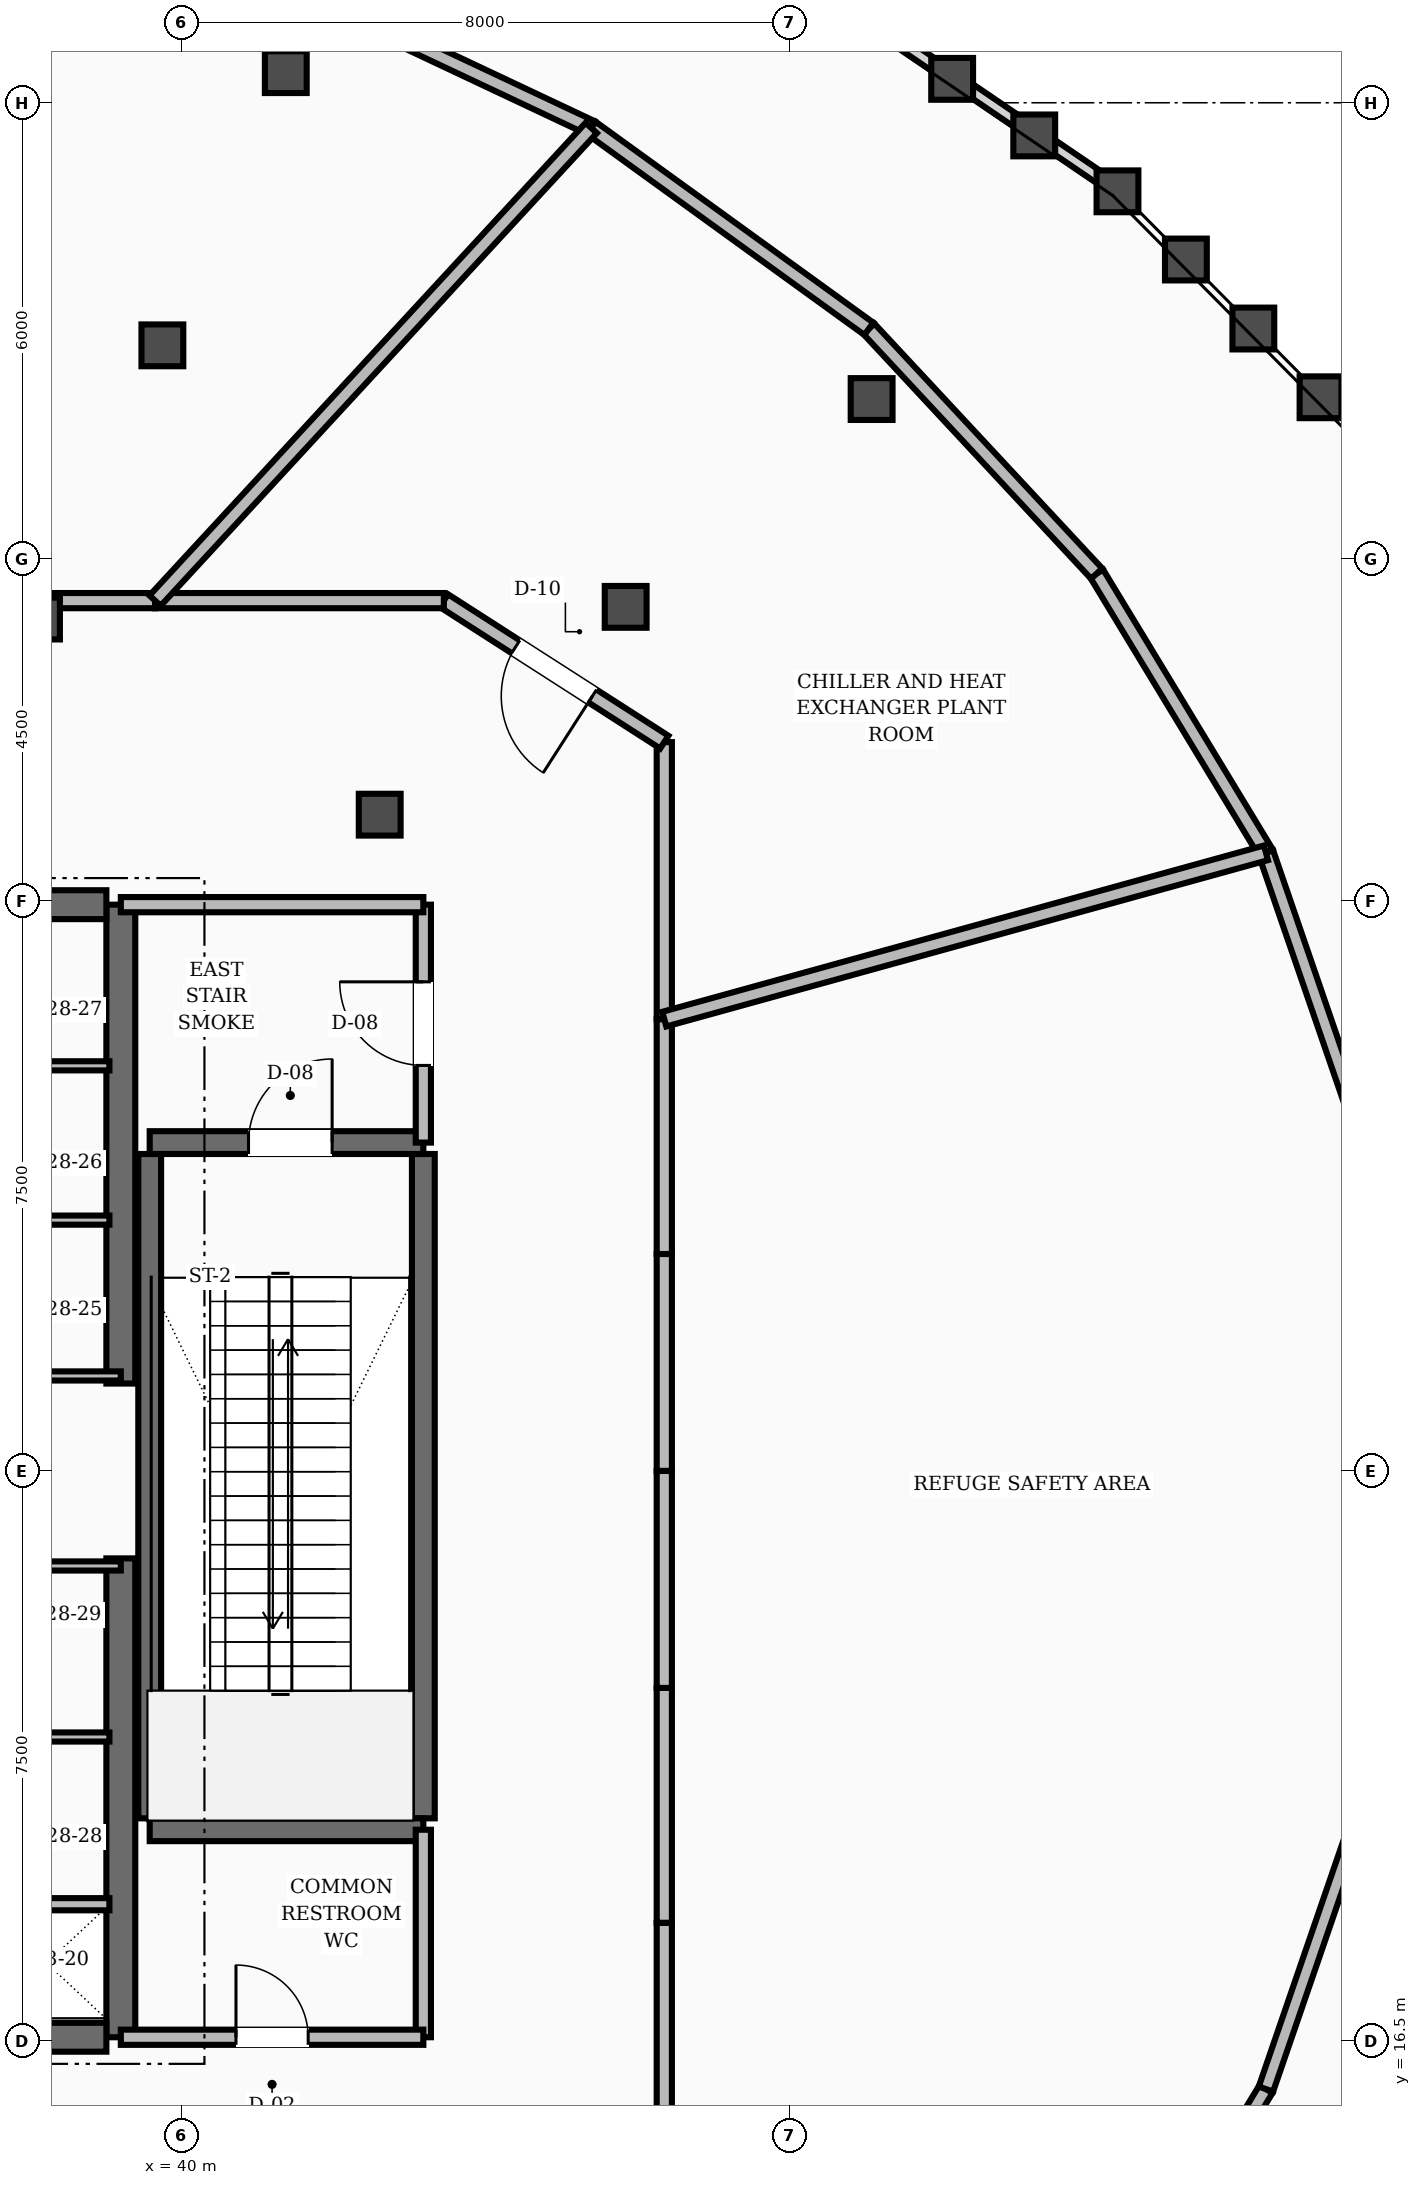
"""IFC4 building model, lengths in metres.
Left out: names, types, materials, properties, quantities, classifications, styles, units other than length and angle.
Written with IfcOpenShell. Run it as: python <this file> out.ifc"""

import sys

from ifc_helpers import new_model, si_unit, direction, frame, frame_2d, origin, place, context, subcontext, project, spatial, rectangle, extrude, element, fill, save


model = new_model("IFC4")
c1 = context("Model", 3, precision=1e-05, world=origin(), true_north=direction((0.0, 1.0)))
c2 = subcontext(c1, "Body", "Model", "MODEL_VIEW")
j1 = project(units=[si_unit("LENGTHUNIT", "METRE"), si_unit("PLANEANGLEUNIT", "RADIAN")], contexts=[c1])
p1 = place(None, origin())
s1 = spatial("IfcSite", under=j1, at=p1, CompositionType="ELEMENT")
p2 = place(p1, origin())
s2 = spatial("IfcBuilding", under=s1, at=p2, CompositionType="ELEMENT")
p3 = place(p2, frame((0.0, 0.0, 110.8)))
s3 = spatial("IfcBuildingStorey", under=s2, at=p3, CompositionType="ELEMENT", Elevation=110.8)
for number, where, z_axis, x_axis in (
    (1, (39.2, 16.55, 0.0), (0.0, 0.0, 1.0), (0.0, 1.0, 0.0)),
    (2, (39.2, 25.15, 0.0), (0.0, 0.0, 1.0), (0.0, 1.0, 0.0)),
):
    element("IfcWall", number, at=place(p3, frame(where, z_axis=z_axis, x_axis=x_axis)), inside=s3, PredefinedType="SHEAR", context=c2, shape_type="SweptSolid", body=[
        extrude(rectangle(XDim=6.3, YDim=0.38, at=frame_2d((3.15, 0.0))), origin(), (0.0, 0.0, 1.0), 6.4),
    ])
p4 = place(p3, frame((35.8, 16.55, 0.0), z_axis=(0.0, 0.0, 1.0), x_axis=(1.0, 0.0, 0.0)))
e3 = element("IfcWall", 3, at=p4, inside=s3, PredefinedType="SHEAR", context=c2, shape_type="SweptSolid", body=[
    extrude(rectangle(XDim=3.21, YDim=0.38, at=frame_2d((1.605, 0.0))), origin(), (0.0, 0.0, 1.0), 6.4),
])
p5 = place(p4, frame((0.3, 0.0, 0.0)))
e4 = element("IfcOpeningElement", 4, at=p5, cuts=e3, PredefinedType="OPENING", context=c2, shape_type="SweptSolid", body=[
    extrude(rectangle(XDim=1.1, YDim=2.1, at=frame_2d((0.55, 1.05))), frame((0.0, 0.2, 0.0), z_axis=(0.0, -1.0, 0.0), x_axis=(1.0, 0.0, 0.0)), (0.0, 0.0, 1.0), 0.4),
])
p6 = place(p3, frame((35.8, 31.45, 0.0), z_axis=(0.0, 0.0, 1.0), x_axis=(1.0, 0.0, 0.0)))
e5 = element("IfcWall", 5, at=p6, inside=s3, PredefinedType="SHEAR", context=c2, shape_type="SweptSolid", body=[
    extrude(rectangle(XDim=3.21, YDim=0.38, at=frame_2d((1.605, 0.0))), origin(), (0.0, 0.0, 1.0), 6.4),
])
for number, where, z_axis, x_axis in (
    (6, (43.18, 19.43, 0.0), (0.0, 0.0, 1.0), (0.0, 1.0, 0.0)),
    (7, (39.58, 19.43, 0.0), (0.0, 0.0, 1.0), (0.0, 1.0, 0.0)),
):
    element("IfcWall", number, at=place(p3, frame(where, z_axis=z_axis, x_axis=x_axis)), inside=s3, PredefinedType="SHEAR", context=c2, shape_type="SweptSolid", body=[
        extrude(rectangle(XDim=8.74, YDim=0.3, at=frame_2d((4.37, 0.0))), origin(), (0.0, 0.0, 1.0), 6.4),
    ])
p7 = place(p3, frame((39.58, 19.28, 0.0), z_axis=(0.0, 0.0, 1.0), x_axis=(1.0, 0.0, 0.0)))
e8 = element("IfcWall", 8, at=p7, inside=s3, PredefinedType="SHEAR", context=c2, shape_type="SweptSolid", body=[
    extrude(rectangle(XDim=3.6, YDim=0.3, at=frame_2d((1.8, 0.0))), origin(), (0.0, 0.0, 1.0), 6.4),
])
p8 = place(p3, frame((39.58, 28.32, 0.0), z_axis=(0.0, 0.0, 1.0), x_axis=(1.0, 0.0, 0.0)))
e9 = element("IfcWall", 9, at=p8, inside=s3, PredefinedType="SHEAR", context=c2, shape_type="SweptSolid", body=[
    extrude(rectangle(XDim=3.6, YDim=0.3, at=frame_2d((1.8, 0.0))), origin(), (0.0, 0.0, 1.0), 6.4),
])
p9 = place(p8, frame((1.3, 0.0, 0.0)))
e10 = element("IfcOpeningElement", 10, at=p9, cuts=e9, PredefinedType="OPENING", context=c2, shape_type="SweptSolid", body=[
    extrude(rectangle(XDim=1.1, YDim=2.1, at=frame_2d((0.55, 1.05))), frame((0.0, 0.16, 0.0), z_axis=(0.0, -1.0, 0.0), x_axis=(1.0, 0.0, 0.0)), (0.0, 0.0, 1.0), 0.32),
])
p10 = place(p3, frame((43.18, 28.32, 0.0), z_axis=(0.0, 0.0, 1.0), x_axis=(0.0, 1.0, 0.0)))
e11 = element("IfcWall", 11, at=p10, inside=s3, PredefinedType="SOLIDWALL", context=c2, shape_type="SweptSolid", body=[
    extrude(rectangle(XDim=3.13, YDim=0.2, at=frame_2d((1.565, 0.0))), origin(), (0.0, 0.0, 1.0), 5.12),
])
p11 = place(p10, frame((1.015, 0.0, 0.0)))
e12 = element("IfcOpeningElement", 12, at=p11, cuts=e11, PredefinedType="OPENING", context=c2, shape_type="SweptSolid", body=[
    extrude(rectangle(XDim=1.1, YDim=2.1, at=frame_2d((0.55, 1.05))), frame((0.0, 0.11, 0.0), z_axis=(0.0, -1.0, 0.0), x_axis=(1.0, 0.0, 0.0)), (0.0, 0.0, 1.0), 0.22),
])
p12 = place(p3, frame((39.2, 31.45, 0.0), z_axis=(0.0, 0.0, 1.0), x_axis=(1.0, 0.0, 0.0)))
e13 = element("IfcWall", 13, at=p12, inside=s3, PredefinedType="SOLIDWALL", context=c2, shape_type="SweptSolid", body=[
    extrude(rectangle(XDim=3.98, YDim=0.2, at=frame_2d((1.99, 0.0))), origin(), (0.0, 0.0, 1.0), 5.12),
])
p13 = place(p3, frame((43.18, 16.55, 0.0), z_axis=(0.0, 0.0, 1.0), x_axis=(0.0, 1.0, 0.0)))
e14 = element("IfcWall", 14, at=p13, inside=s3, PredefinedType="SOLIDWALL", context=c2, shape_type="SweptSolid", body=[
    extrude(rectangle(XDim=2.73, YDim=0.2, at=frame_2d((1.365, 0.0))), origin(), (0.0, 0.0, 1.0), 5.12),
])
p14 = place(p3, frame((39.2, 16.55, 0.0), z_axis=(0.0, 0.0, 1.0), x_axis=(1.0, 0.0, 0.0)))
e15 = element("IfcWall", 15, at=p14, inside=s3, PredefinedType="SOLIDWALL", context=c2, shape_type="SweptSolid", body=[
    extrude(rectangle(XDim=3.98, YDim=0.2, at=frame_2d((1.99, 0.0))), origin(), (0.0, 0.0, 1.0), 5.12),
])
p15 = place(p14, frame((1.515, 0.0, 0.0)))
e16 = element("IfcOpeningElement", 16, at=p15, cuts=e15, PredefinedType="OPENING", context=c2, shape_type="SweptSolid", body=[
    extrude(rectangle(XDim=0.95, YDim=2.1, at=frame_2d((0.475, 1.05))), frame((0.0, 0.11, 0.0), z_axis=(0.0, -1.0, 0.0), x_axis=(1.0, 0.0, 0.0)), (0.0, 0.0, 1.0), 0.22),
])
p16 = place(p3, frame((37.4, 18.3, 0.0), z_axis=(0.0, 0.0, 1.0), x_axis=(1.0, 0.0, 0.0)))
e17 = element("IfcWall", 17, at=p16, inside=s3, PredefinedType="SOLIDWALL", context=c2, shape_type="SweptSolid", body=[
    extrude(rectangle(XDim=1.65, YDim=0.16, at=frame_2d((0.825, 0.0))), origin(), (0.0, 0.0, 1.0), 5.12),
])
for number, where, z_axis, x_axis in (
    (18, (37.4, 25.25, 0.0), (0.0, 0.0, 1.0), (1.0, 0.0, 0.0)),
    (19, (37.4, 22.75, 0.0), (0.0, 0.0, 1.0), (1.0, 0.0, 0.0)),
):
    element("IfcWall", number, at=place(p3, frame(where, z_axis=z_axis, x_axis=x_axis)), inside=s3, PredefinedType="PARTITIONING", context=c2, shape_type="SweptSolid", body=[
        extrude(rectangle(XDim=1.8, YDim=0.12, at=frame_2d((0.9, 0.0))), origin(), (0.0, 0.0, 1.0), 5.12),
    ])
for number, where, z_axis, x_axis in (
    (20, (37.4, 27.3, 0.0), (0.0, 0.0, 1.0), (1.0, 0.0, 0.0)),
    (21, (37.4, 29.33, 0.0), (0.0, 0.0, 1.0), (1.0, 0.0, 0.0)),
    (22, (37.4, 20.5, 0.0), (0.0, 0.0, 1.0), (1.0, 0.0, 0.0)),
):
    element("IfcWall", number, at=place(p3, frame(where, z_axis=z_axis, x_axis=x_axis)), inside=s3, PredefinedType="PARTITIONING", context=c2, shape_type="SweptSolid", body=[
        extrude(rectangle(XDim=1.65, YDim=0.12, at=frame_2d((0.825, 0.0))), origin(), (0.0, 0.0, 1.0), 5.12),
    ])
p17 = place(p3, frame((55.637, 28.146, 0.0), z_axis=(0.0, 0.0, 1.0), x_axis=(-0.325351665006, 0.945593091175, 0.0)))
e23 = element("IfcWall", 23, at=p17, inside=s3, PredefinedType="SOLIDWALL", context=c2, shape_type="SweptSolid", body=[
    extrude(rectangle(XDim=4.216, YDim=0.2, at=frame_2d((2.108, 0.0))), origin(), (0.0, 0.0, 1.0), 5.12),
])
p18 = place(p3, frame((54.265, 32.132, 0.0), z_axis=(0.0, 0.0, 1.0), x_axis=(-0.518384837447, 0.855147449452, 0.0)))
e24 = element("IfcWall", 24, at=p18, inside=s3, PredefinedType="SOLIDWALL", context=c2, shape_type="SweptSolid", body=[
    extrude(rectangle(XDim=4.296, YDim=0.2, at=frame_2d((2.148, 0.0))), origin(), (0.0, 0.0, 1.0), 5.12),
])
p19 = place(p3, frame((52.038, 35.806, 0.0), z_axis=(0.0, 0.0, 1.0), x_axis=(-0.681317030747, 0.731988458661, 0.0)))
e25 = element("IfcWall", 25, at=p19, inside=s3, PredefinedType="SOLIDWALL", context=c2, shape_type="SweptSolid", body=[
    extrude(rectangle(XDim=4.399, YDim=0.2, at=frame_2d((2.199, 0.0))), origin(), (0.0, 0.0, 1.0), 5.12),
])
p20 = place(p3, frame((49.041, 39.026, 0.0), z_axis=(0.0, 0.0, 1.0), x_axis=(-0.810131923704, 0.586247615088, 0.0)))
e26 = element("IfcWall", 26, at=p20, inside=s3, PredefinedType="SOLIDWALL", context=c2, shape_type="SweptSolid", body=[
    extrude(rectangle(XDim=4.508, YDim=0.2, at=frame_2d((2.254, 0.0))), origin(), (0.0, 0.0, 1.0), 5.12),
])
p21 = place(p3, frame((45.389, 41.669, 0.0), z_axis=(0.0, 0.0, 1.0), x_axis=(-0.904574703116, 0.426315149253, 0.0)))
e27 = element("IfcWall", 27, at=p21, inside=s3, PredefinedType="SOLIDWALL", context=c2, shape_type="SweptSolid", body=[
    extrude(rectangle(XDim=4.606, YDim=0.2, at=frame_2d((2.303, 0.0))), origin(), (0.0, 0.0, 1.0), 5.12),
])
p22 = place(p3, frame((52.038, 12.194, 0.0), z_axis=(0.0, 0.0, 1.0), x_axis=(0.518384837447, 0.855147449452, 0.0)))
e28 = element("IfcWall", 28, at=p22, inside=s3, PredefinedType="SOLIDWALL", context=c2, shape_type="SweptSolid", body=[
    extrude(rectangle(XDim=4.296, YDim=0.2, at=frame_2d((2.148, 0.0))), origin(), (0.0, 0.0, 1.0), 5.12),
])
p23 = place(p3, frame((54.265, 15.868, 0.0), z_axis=(0.0, 0.0, 1.0), x_axis=(0.325351665006, 0.945593091175, 0.0)))
e29 = element("IfcWall", 29, at=p23, inside=s3, PredefinedType="SOLIDWALL", context=c2, shape_type="SweptSolid", body=[
    extrude(rectangle(XDim=4.216, YDim=0.2, at=frame_2d((2.108, 0.0))), origin(), (0.0, 0.0, 1.0), 5.12),
])
p24 = place(p3, frame((46.35, 24.0, 0.0), z_axis=(0.0, 0.0, 1.0), x_axis=(0.0, 1.0, 0.0)))
e30 = element("IfcWall", 30, at=p24, inside=s3, PredefinedType="SOLIDWALL", context=c2, shape_type="SweptSolid", body=[
    extrude(rectangle(XDim=2.854, YDim=0.2, at=frame_2d((1.427, 0.0))), origin(), (0.0, 0.0, 1.0), 5.12),
])
p25 = place(p3, frame((46.35, 26.854, 0.0), z_axis=(0.0, 0.0, 1.0), x_axis=(0.0, 1.0, 0.0)))
e31 = element("IfcWall", 31, at=p25, inside=s3, PredefinedType="SOLIDWALL", context=c2, shape_type="SweptSolid", body=[
    extrude(rectangle(XDim=3.09, YDim=0.2, at=frame_2d((1.545, 0.0))), origin(), (0.0, 0.0, 1.0), 5.12),
])
p26 = place(p3, frame((46.35, 29.944, 0.0), z_axis=(0.0, 0.0, 1.0), x_axis=(0.0, 1.0, 0.0)))
e32 = element("IfcWall", 32, at=p26, inside=s3, PredefinedType="SOLIDWALL", context=c2, shape_type="SweptSolid", body=[
    extrude(rectangle(XDim=3.644, YDim=0.2, at=frame_2d((1.822, 0.0))), origin(), (0.0, 0.0, 1.0), 5.12),
])
p27 = place(p3, frame((46.35, 33.588, 0.0), z_axis=(0.0, 0.0, 1.0), x_axis=(-0.841548863049, 0.540180998464, 0.0)))
e33 = element("IfcWall", 33, at=p27, inside=s3, PredefinedType="SOLIDWALL", context=c2, shape_type="SweptSolid", body=[
    extrude(rectangle(XDim=3.446, YDim=0.2, at=frame_2d((1.723, 0.0))), origin(), (0.0, 0.0, 1.0), 5.12),
])
p28 = place(p27, frame((1.123, 0.0, 0.0)))
e34 = element("IfcOpeningElement", 34, at=p28, cuts=e33, PredefinedType="OPENING", context=c2, shape_type="SweptSolid", body=[
    extrude(rectangle(XDim=1.2, YDim=2.1, at=frame_2d((0.6, 1.05))), frame((0.0, 0.11, 0.0), z_axis=(0.0, -1.0, 0.0), x_axis=(1.0, 0.0, 0.0)), (0.0, 0.0, 1.0), 0.22),
])
p29 = place(p3, frame((43.45, 35.45, 0.0), z_axis=(0.0, 0.0, 1.0), x_axis=(-1.0, 0.0, 0.0)))
e35 = element("IfcWall", 35, at=p29, inside=s3, PredefinedType="SOLIDWALL", context=c2, shape_type="SweptSolid", body=[
    extrude(rectangle(XDim=3.799, YDim=0.2, at=frame_2d((1.9, 0.0))), origin(), (0.0, 0.0, 1.0), 5.12),
])
p30 = place(p3, frame((39.651, 35.45, 0.0), z_axis=(0.0, 0.0, 1.0), x_axis=(-1.0, 0.0, 0.0)))
e36 = element("IfcWall", 36, at=p30, inside=s3, PredefinedType="SOLIDWALL", context=c2, shape_type="SweptSolid", body=[
    extrude(rectangle(XDim=2.908, YDim=0.2, at=frame_2d((1.454, 0.0))), origin(), (0.0, 0.0, 1.0), 5.12),
])
p31 = place(p3, frame((46.35, 14.412, 0.0), z_axis=(0.0, 0.0, 1.0), x_axis=(0.0, 1.0, 0.0)))
e37 = element("IfcWall", 37, at=p31, inside=s3, PredefinedType="SOLIDWALL", context=c2, shape_type="SweptSolid", body=[
    extrude(rectangle(XDim=3.644, YDim=0.2, at=frame_2d((1.822, 0.0))), origin(), (0.0, 0.0, 1.0), 5.12),
])
p32 = place(p3, frame((46.35, 18.056, 0.0), z_axis=(0.0, 0.0, 1.0), x_axis=(0.0, 1.0, 0.0)))
e38 = element("IfcWall", 38, at=p32, inside=s3, PredefinedType="SOLIDWALL", context=c2, shape_type="SweptSolid", body=[
    extrude(rectangle(XDim=3.09, YDim=0.2, at=frame_2d((1.545, 0.0))), origin(), (0.0, 0.0, 1.0), 5.12),
])
p33 = place(p3, frame((46.35, 21.146, 0.0), z_axis=(0.0, 0.0, 1.0), x_axis=(0.0, 1.0, 0.0)))
e39 = element("IfcWall", 39, at=p33, inside=s3, PredefinedType="SOLIDWALL", context=c2, shape_type="SweptSolid", body=[
    extrude(rectangle(XDim=2.854, YDim=0.2, at=frame_2d((1.427, 0.0))), origin(), (0.0, 0.0, 1.0), 5.12),
])
p34 = place(p3, frame((46.35, 29.944, 0.0), z_axis=(0.0, 0.0, 1.0), x_axis=(0.963853201809, 0.266433866772, 0.0)))
e40 = element("IfcWall", 40, at=p34, inside=s3, PredefinedType="SOLIDWALL", context=c2, shape_type="SweptSolid", body=[
    extrude(rectangle(XDim=8.212, YDim=0.2, at=frame_2d((4.106, 0.0))), origin(), (0.0, 0.0, 1.0), 5.12),
])
p35 = place(p3, frame((39.651, 35.45, 0.0), z_axis=(0.0, 0.0, 1.0), x_axis=(0.678161460471, 0.734912942825, 0.0)))
e41 = element("IfcWall", 41, at=p35, inside=s3, PredefinedType="SOLIDWALL", context=c2, shape_type="SweptSolid", body=[
    extrude(rectangle(XDim=8.462, YDim=0.2, at=frame_2d((4.231, 0.0))), origin(), (0.0, 0.0, 1.0), 5.12),
])
p36 = place(p9, origin())
e42 = element("IfcDoor", 42, at=p36, inside=s3, OperationType="SINGLE_SWING_RIGHT", PredefinedType="DOOR", context=c2, shape_type="SweptSolid", body=[
    extrude(rectangle(XDim=1.1, YDim=2.1, at=frame_2d((0.55, 1.05))), frame((0.0, 0.025, 0.0), z_axis=(0.0, -1.0, 0.0), x_axis=(1.0, 0.0, 0.0)), (0.0, 0.0, 1.0), 0.05),
])
fill(e10, e42)
p37 = place(p11, origin())
e43 = element("IfcDoor", 43, at=p37, inside=s3, OperationType="SINGLE_SWING_RIGHT", PredefinedType="DOOR", context=c2, shape_type="SweptSolid", body=[
    extrude(rectangle(XDim=1.1, YDim=2.1, at=frame_2d((0.55, 1.05))), frame((0.0, 0.025, 0.0), z_axis=(0.0, -1.0, 0.0), x_axis=(1.0, 0.0, 0.0)), (0.0, 0.0, 1.0), 0.05),
])
fill(e12, e43)
p38 = place(p15, origin())
e44 = element("IfcDoor", 44, at=p38, inside=s3, OperationType="SINGLE_SWING_LEFT", PredefinedType="DOOR", context=c2, shape_type="SweptSolid", body=[
    extrude(rectangle(XDim=0.95, YDim=2.1, at=frame_2d((0.475, 1.05))), frame((0.0, 0.025, 0.0), z_axis=(0.0, -1.0, 0.0), x_axis=(1.0, 0.0, 0.0)), (0.0, 0.0, 1.0), 0.05),
])
fill(e16, e44)
p39 = place(p28, origin())
e45 = element("IfcDoor", 45, at=p39, inside=s3, OperationType="SINGLE_SWING_LEFT", PredefinedType="DOOR", context=c2, shape_type="SweptSolid", body=[
    extrude(rectangle(XDim=1.2, YDim=2.1, at=frame_2d((0.6, 1.05))), frame((0.0, 0.025, 0.0), z_axis=(0.0, -1.0, 0.0), x_axis=(1.0, 0.0, 0.0)), (0.0, 0.0, 1.0), 0.05),
])
fill(e34, e45)
save(model, sys.argv[1])
